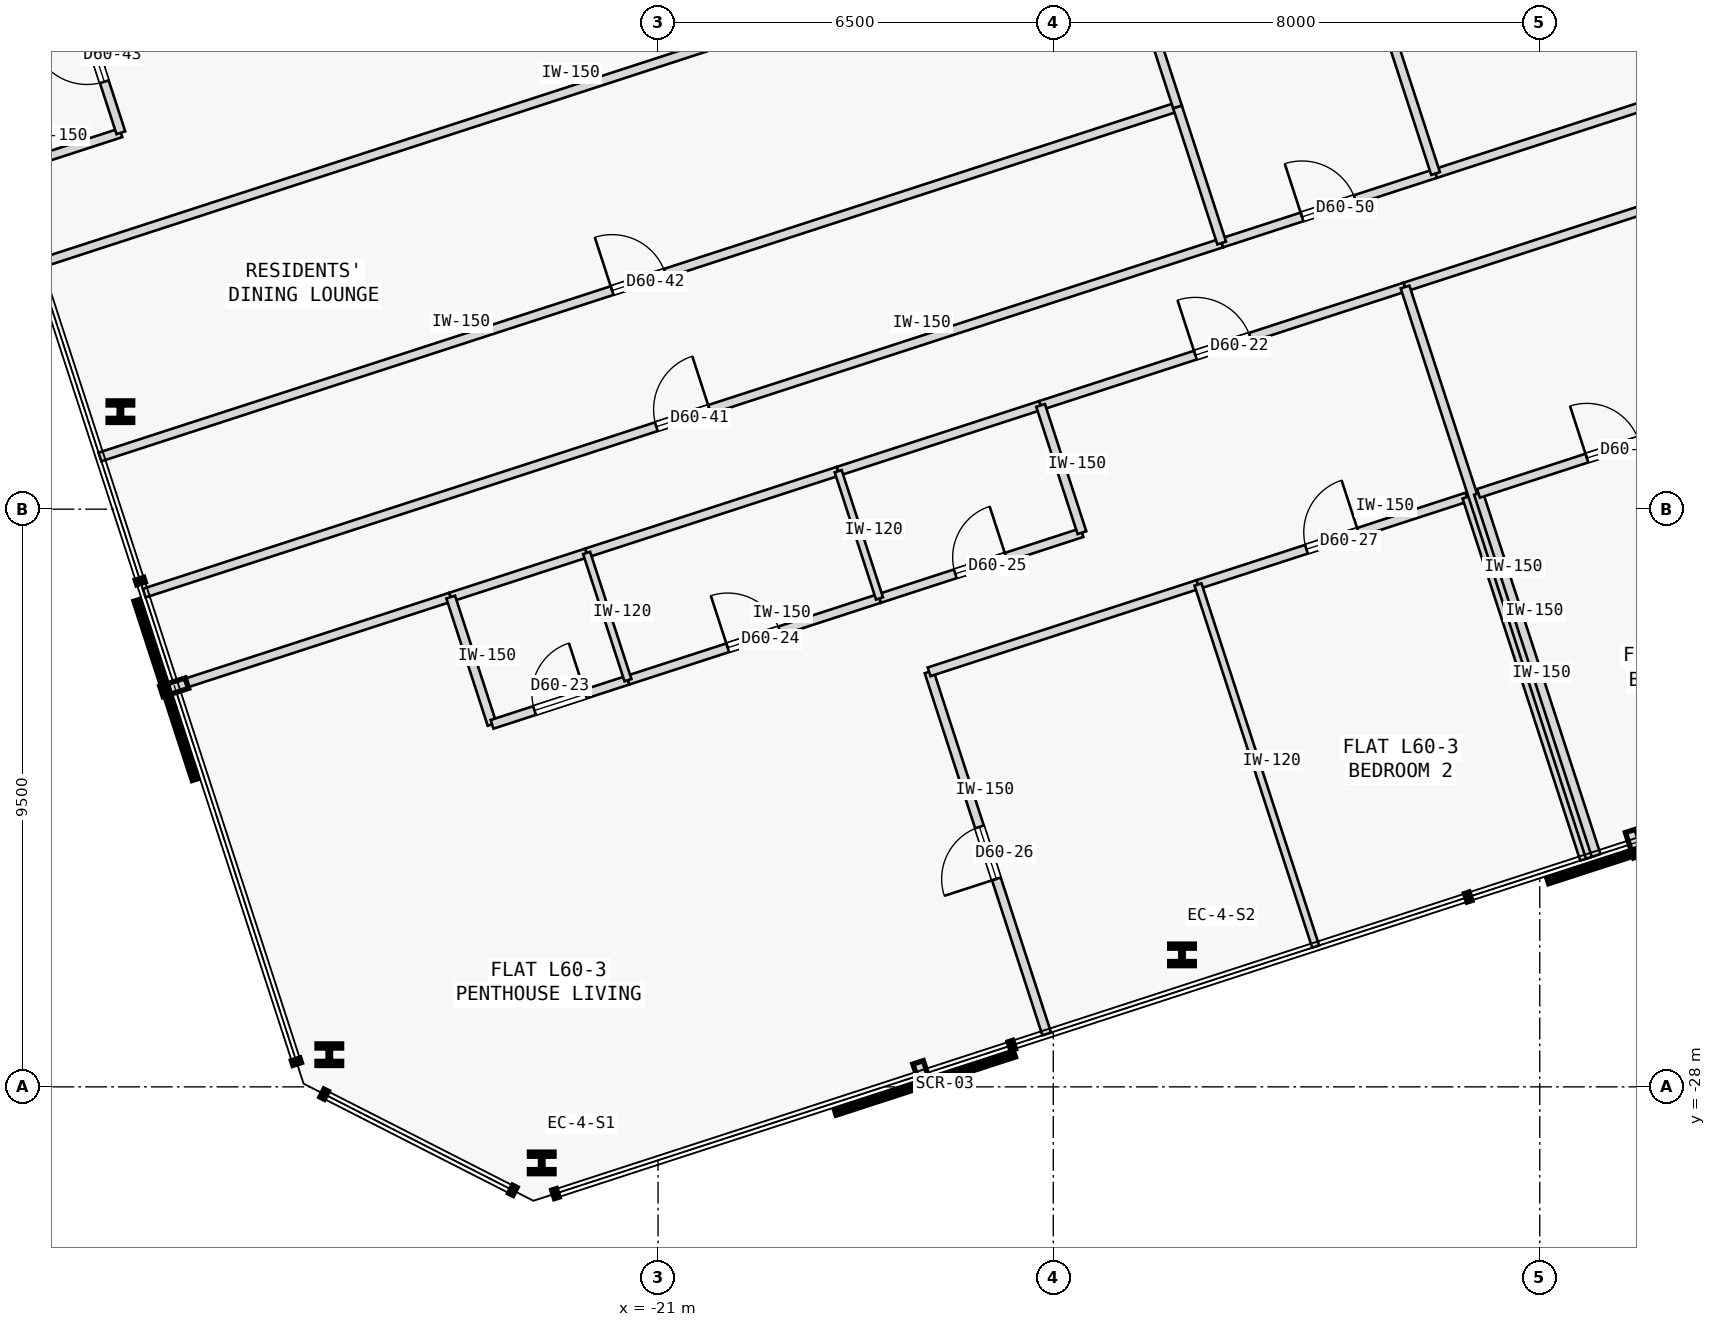
"""IFC4 building model, lengths in metres.
Left out: names, types, materials, properties, quantities, classifications, styles, units other than length and angle.
Written with IfcOpenShell. Run it as: python <this file> out.ifc"""

import sys

from ifc_helpers import new_model, si_unit, direction, frame, frame_2d, origin, origin_2d, place, context, subcontext, project, spatial, rectangle, i_section, extrude, element, fill, save


model = new_model("IFC4")
c1 = context("Model", 3, precision=1e-05, world=origin(), true_north=direction((0.0, 1.0)))
c2 = subcontext(c1, "Body", "Model", "MODEL_VIEW")
j1 = project(units=[si_unit("LENGTHUNIT", "METRE"), si_unit("PLANEANGLEUNIT", "RADIAN")], contexts=[c1])
p1 = place(None, origin())
s1 = spatial("IfcSite", under=j1, at=p1, CompositionType="ELEMENT")
p2 = place(p1, origin())
s2 = spatial("IfcBuilding", under=s1, at=p2, CompositionType="ELEMENT")
p3 = place(p2, frame((0.0, 0.0, 227.65)))
s3 = spatial("IfcBuildingStorey", under=s2, at=p3, CompositionType="ELEMENT", Elevation=227.65)
for number, where, z_axis, x_axis in (
    (1, (-22.913, -29.251, 0.0), (0.0, 0.0, 1.0), (1.0, 0.0, 0.0)),
    (2, (-12.384, -25.83, 0.0), (0.0, 0.0, 1.0), (1.0, 0.0, 0.0)),
    (3, (-29.842, -16.897, 0.0), (0.0, 0.0, 1.0), (1.0, 0.0, 0.0)),
    (4, (-26.406, -27.471, 0.0), (0.0, 0.0, 1.0), (1.0, 0.0, 0.0)),
):
    element("IfcColumn", number, at=place(p3, frame(where, z_axis=z_axis, x_axis=x_axis)), inside=s3, PredefinedType="COLUMN", context=c2, shape_type="SweptSolid", body=[
        extrude(i_section(OverallWidth=0.405, OverallDepth=0.355, WebThickness=0.042, FlangeThickness=0.068, FilletRadius=0.015, at=origin_2d()), origin(), (0.0, 0.0, 1.0), 3.35),
    ])
p4 = place(p3, frame((-28.95, -21.421, 0.0), z_axis=(0.0, 0.0, 1.0), x_axis=(0.951049476022, 0.309038661268, 0.0)))
e5 = element("IfcWall", 5, at=p4, inside=s3, PredefinedType="PARTITIONING", context=c2, shape_type="SweptSolid", body=[
    extrude(rectangle(XDim=4.774, YDim=0.15, at=frame_2d((2.387, 0.0))), origin(), (0.0, 0.0, 1.0), 3.125),
])
p5 = place(p3, frame((-14.709, -16.794, 0.0), z_axis=(0.0, 0.0, 1.0), x_axis=(0.951050295235, 0.309036140172, 0.0)))
e6 = element("IfcWall", 6, at=p5, inside=s3, PredefinedType="PARTITIONING", context=c2, shape_type="SweptSolid", body=[
    extrude(rectangle(XDim=6.302, YDim=0.15, at=frame_2d((3.151, 0.0))), origin(), (0.0, 0.0, 1.0), 3.125),
])
p6 = place(p5, frame((2.676, 0.0, 0.0)))
e7 = element("IfcOpeningElement", 7, at=p6, cuts=e6, PredefinedType="OPENING", context=c2, shape_type="SweptSolid", body=[
    extrude(rectangle(XDim=0.95, YDim=2.15, at=frame_2d((0.475, 1.075))), frame((0.0, 0.085, 0.0), z_axis=(0.0, -1.0, 0.0), x_axis=(1.0, 0.0, 0.0)), (0.0, 0.0, 1.0), 0.17),
])
p7 = place(p3, frame((-24.41, -19.946, 0.0), z_axis=(0.0, 0.0, 1.0), x_axis=(0.951076048914, 0.308956872689, 0.0)))
e8 = element("IfcWall", 8, at=p7, inside=s3, PredefinedType="PARTITIONING", context=c2, shape_type="SweptSolid", body=[
    extrude(rectangle(XDim=2.35, YDim=0.15, at=frame_2d((1.175, 0.0))), origin(), (0.0, 0.0, 1.0), 3.125),
])
p8 = place(p3, frame((-22.175, -19.22, 0.0), z_axis=(0.0, 0.0, 1.0), x_axis=(0.951052627573, 0.309028962374, 0.0)))
e9 = element("IfcWall", 9, at=p8, inside=s3, PredefinedType="PARTITIONING", context=c2, shape_type="SweptSolid", body=[
    extrude(rectangle(XDim=4.35, YDim=0.15, at=frame_2d((2.175, 0.0))), origin(), (0.0, 0.0, 1.0), 3.125),
])
p9 = place(p3, frame((-18.038, -17.876, 0.0), z_axis=(0.0, 0.0, 1.0), x_axis=(0.951062257173, 0.308999325213, 0.0)))
e10 = element("IfcWall", 10, at=p9, inside=s3, PredefinedType="PARTITIONING", context=c2, shape_type="SweptSolid", body=[
    extrude(rectangle(XDim=3.5, YDim=0.15, at=frame_2d((1.75, 0.0))), origin(), (0.0, 0.0, 1.0), 3.125),
])
p10 = place(p3, frame((-8.715, -14.847, 0.0), z_axis=(0.0, 0.0, 1.0), x_axis=(0.951061767293, 0.309000832997, 0.0)))
e11 = element("IfcWall", 11, at=p10, inside=s3, PredefinedType="PARTITIONING", context=c2, shape_type="SweptSolid", body=[
    extrude(rectangle(XDim=4.404, YDim=0.15, at=frame_2d((2.202, 0.0))), origin(), (0.0, 0.0, 1.0), 3.125),
])
p11 = place(p3, frame((-29.45, -19.881, 0.0), z_axis=(0.0, 0.0, 1.0), x_axis=(0.95105650271, 0.309017036186, 0.0)))
e12 = element("IfcWall", 12, at=p11, inside=s3, PredefinedType="PARTITIONING", context=c2, shape_type="SweptSolid", body=[
    extrude(rectangle(XDim=18.632, YDim=0.15, at=frame_2d((9.316, 0.0))), origin(), (0.0, 0.0, 1.0), 3.125),
])
p12 = place(p11, frame((8.856, 0.0, 0.0)))
e13 = element("IfcOpeningElement", 13, at=p12, cuts=e12, PredefinedType="OPENING", context=c2, shape_type="SweptSolid", body=[
    extrude(rectangle(XDim=0.92, YDim=2.15, at=frame_2d((0.46, 1.075))), frame((0.0, 0.085, 0.0), z_axis=(0.0, -1.0, 0.0), x_axis=(1.0, 0.0, 0.0)), (0.0, 0.0, 1.0), 0.17),
])
p13 = place(p3, frame((-31.712, -12.921, 0.0), z_axis=(0.0, 0.0, 1.0), x_axis=(0.951054051148, 0.309024581215, 0.0)))
e14 = element("IfcWall", 14, at=p13, inside=s3, PredefinedType="PARTITIONING", context=c2, shape_type="SweptSolid", body=[
    extrude(rectangle(XDim=1.975, YDim=0.15, at=frame_2d((0.988, 0.0))), origin(), (0.0, 0.0, 1.0), 3.125),
])
p14 = place(p3, frame((-29.833, -12.311, 0.0), z_axis=(0.0, 0.0, 1.0), x_axis=(-0.309044953986, 0.951047431213, 0.0)))
e15 = element("IfcWall", 15, at=p14, inside=s3, PredefinedType="PARTITIONING", context=c2, shape_type="SweptSolid", body=[
    extrude(rectangle(XDim=2.685, YDim=0.15, at=frame_2d((1.343, 0.0))), origin(), (0.0, 0.0, 1.0), 3.125),
])
p15 = place(p14, frame((0.883, 0.0, 0.0)))
e16 = element("IfcOpeningElement", 16, at=p15, cuts=e15, PredefinedType="OPENING", context=c2, shape_type="SweptSolid", body=[
    extrude(rectangle(XDim=0.92, YDim=2.15, at=frame_2d((0.46, 1.075))), frame((0.0, 0.085, 0.0), z_axis=(0.0, -1.0, 0.0), x_axis=(1.0, 0.0, 0.0)), (0.0, 0.0, 1.0), 0.17),
])
p16 = place(p3, frame((-11.73, -14.123, 0.0), z_axis=(0.0, 0.0, 1.0), x_axis=(0.951052502763, 0.309029346483, 0.0)))
e17 = element("IfcWall", 17, at=p16, inside=s3, PredefinedType="PARTITIONING", context=c2, shape_type="SweptSolid", body=[
    extrude(rectangle(XDim=3.698, YDim=0.15, at=frame_2d((1.849, 0.0))), origin(), (0.0, 0.0, 1.0), 3.125),
])
p17 = place(p16, frame((1.389, 0.0, 0.0)))
e18 = element("IfcOpeningElement", 18, at=p17, cuts=e17, PredefinedType="OPENING", context=c2, shape_type="SweptSolid", body=[
    extrude(rectangle(XDim=0.92, YDim=2.15, at=frame_2d((0.46, 1.075))), frame((0.0, 0.085, 0.0), z_axis=(0.0, -1.0, 0.0), x_axis=(1.0, 0.0, 0.0)), (0.0, 0.0, 1.0), 0.17),
])
p18 = place(p3, frame((-8.213, -12.98, 0.0), z_axis=(0.0, 0.0, 1.0), x_axis=(0.951058260096, 0.309011627456, 0.0)))
e19 = element("IfcWall", 19, at=p18, inside=s3, PredefinedType="PARTITIONING", context=c2, shape_type="SweptSolid", body=[
    extrude(rectangle(XDim=4.746, YDim=0.15, at=frame_2d((2.373, 0.0))), origin(), (0.0, 0.0, 1.0), 3.125),
])
p19 = place(p3, frame((-23.73, -22.038, 0.0), z_axis=(0.0, 0.0, 1.0), x_axis=(-0.309060979314, 0.951042223598, 0.0)))
e20 = element("IfcWall", 20, at=p19, inside=s3, PredefinedType="PARTITIONING", context=c2, shape_type="SweptSolid", body=[
    extrude(rectangle(XDim=2.2, YDim=0.15, at=frame_2d((1.1, 0.0))), origin(), (0.0, 0.0, 1.0), 3.125),
])
p20 = place(p3, frame((-23.73, -22.038, 0.0), z_axis=(0.0, 0.0, 1.0), x_axis=(0.951066131077, 0.308987401554, 0.0)))
e21 = element("IfcWall", 21, at=p20, inside=s3, PredefinedType="PARTITIONING", context=c2, shape_type="SweptSolid", body=[
    extrude(rectangle(XDim=2.35, YDim=0.15, at=frame_2d((1.175, 0.0))), origin(), (0.0, 0.0, 1.0), 3.125),
])
p21 = place(p20, frame((0.735, 0.0, 0.0)))
e22 = element("IfcOpeningElement", 22, at=p21, cuts=e21, PredefinedType="OPENING", context=c2, shape_type="SweptSolid", body=[
    extrude(rectangle(XDim=0.88, YDim=2.15, at=frame_2d((0.44, 1.075))), frame((0.0, 0.085, 0.0), z_axis=(0.0, -1.0, 0.0), x_axis=(1.0, 0.0, 0.0)), (0.0, 0.0, 1.0), 0.17),
])
p22 = place(p3, frame((-21.495, -21.312, 0.0), z_axis=(0.0, 0.0, 1.0), x_axis=(0.951057987102, 0.309012467661, 0.0)))
e23 = element("IfcWall", 23, at=p22, inside=s3, PredefinedType="PARTITIONING", context=c2, shape_type="SweptSolid", body=[
    extrude(rectangle(XDim=4.35, YDim=0.15, at=frame_2d((2.175, 0.0))), origin(), (0.0, 0.0, 1.0), 3.125),
])
p23 = place(p22, frame((1.725, 0.0, 0.0)))
e24 = element("IfcOpeningElement", 24, at=p23, cuts=e23, PredefinedType="OPENING", context=c2, shape_type="SweptSolid", body=[
    extrude(rectangle(XDim=0.9, YDim=2.15, at=frame_2d((0.45, 1.075))), frame((0.0, 0.085, 0.0), z_axis=(0.0, -1.0, 0.0), x_axis=(1.0, 0.0, 0.0)), (0.0, 0.0, 1.0), 0.17),
])
p24 = place(p3, frame((-17.358, -19.968, 0.0), z_axis=(0.0, 0.0, 1.0), x_axis=(0.951055596592, 0.309019824916, 0.0)))
e25 = element("IfcWall", 25, at=p24, inside=s3, PredefinedType="PARTITIONING", context=c2, shape_type="SweptSolid", body=[
    extrude(rectangle(XDim=3.5, YDim=0.15, at=frame_2d((1.75, 0.0))), origin(), (0.0, 0.0, 1.0), 3.125),
])
p25 = place(p24, frame((1.31, 0.0, 0.0)))
e26 = element("IfcOpeningElement", 26, at=p25, cuts=e25, PredefinedType="OPENING", context=c2, shape_type="SweptSolid", body=[
    extrude(rectangle(XDim=0.88, YDim=2.15, at=frame_2d((0.44, 1.075))), frame((0.0, 0.085, 0.0), z_axis=(0.0, -1.0, 0.0), x_axis=(1.0, 0.0, 0.0)), (0.0, 0.0, 1.0), 0.17),
])
p26 = place(p3, frame((-14.029, -18.886, 0.0), z_axis=(0.0, 0.0, 1.0), x_axis=(-0.308960600764, 0.951074837842, 0.0)))
e27 = element("IfcWall", 27, at=p26, inside=s3, PredefinedType="PARTITIONING", context=c2, shape_type="SweptSolid", body=[
    extrude(rectangle(XDim=2.2, YDim=0.15, at=frame_2d((1.1, 0.0))), origin(), (0.0, 0.0, 1.0), 3.125),
])
p27 = place(p3, frame((-14.608, -27.131, 0.0), z_axis=(0.0, 0.0, 1.0), x_axis=(-0.309013782848, 0.951057559777, 0.0)))
e28 = element("IfcWall", 28, at=p27, inside=s3, PredefinedType="PARTITIONING", context=c2, shape_type="SweptSolid", body=[
    extrude(rectangle(XDim=6.262, YDim=0.15, at=frame_2d((3.131, 0.0))), origin(), (0.0, 0.0, 1.0), 3.125),
])
p28 = place(p27, frame((2.681, 0.0, 0.0)))
e29 = element("IfcOpeningElement", 29, at=p28, cuts=e28, PredefinedType="OPENING", context=c2, shape_type="SweptSolid", body=[
    extrude(rectangle(XDim=0.9, YDim=2.15, at=frame_2d((0.45, 1.075))), frame((0.0, 0.085, 0.0), z_axis=(0.0, -1.0, 0.0), x_axis=(1.0, 0.0, 0.0)), (0.0, 0.0, 1.0), 0.17),
])
p29 = place(p3, frame((-16.543, -21.175, 0.0), z_axis=(0.0, 0.0, 1.0), x_axis=(0.951050272606, 0.309036209813, 0.0)))
e30 = element("IfcWall", 30, at=p29, inside=s3, PredefinedType="PARTITIONING", context=c2, shape_type="SweptSolid", body=[
    extrude(rectangle(XDim=4.65, YDim=0.15, at=frame_2d((2.325, 0.0))), origin(), (0.0, 0.0, 1.0), 3.125),
])
p30 = place(p3, frame((-12.12, -19.738, 0.0), z_axis=(0.0, 0.0, 1.0), x_axis=(0.951065702951, 0.308988719326, 0.0)))
e31 = element("IfcWall", 31, at=p30, inside=s3, PredefinedType="PARTITIONING", context=c2, shape_type="SweptSolid", body=[
    extrude(rectangle(XDim=4.65, YDim=0.15, at=frame_2d((2.325, 0.0))), origin(), (0.0, 0.0, 1.0), 3.125),
])
p31 = place(p30, frame((1.875, 0.0, 0.0)))
e32 = element("IfcOpeningElement", 32, at=p31, cuts=e31, PredefinedType="OPENING", context=c2, shape_type="SweptSolid", body=[
    extrude(rectangle(XDim=0.9, YDim=2.15, at=frame_2d((0.45, 1.075))), frame((0.0, 0.085, 0.0), z_axis=(0.0, -1.0, 0.0), x_axis=(1.0, 0.0, 0.0)), (0.0, 0.0, 1.0), 0.17),
])
p32 = place(p3, frame((-5.763, -24.257, 0.0), z_axis=(0.0, 0.0, 1.0), x_axis=(-0.309060506107, 0.951042377376, 0.0)))
e33 = element("IfcWall", 33, at=p32, inside=s3, PredefinedType="PARTITIONING", context=c2, shape_type="SweptSolid", body=[
    extrude(rectangle(XDim=6.262, YDim=0.15, at=frame_2d((3.131, 0.0))), origin(), (0.0, 0.0, 1.0), 3.125),
])
p33 = place(p3, frame((-5.668, -24.226, 0.0), z_axis=(0.0, 0.0, 1.0), x_axis=(-0.309022258842, 0.95105480575, 0.0)))
e34 = element("IfcWall", 34, at=p33, inside=s3, PredefinedType="PARTITIONING", context=c2, shape_type="SweptSolid", body=[
    extrude(rectangle(XDim=9.862, YDim=0.15, at=frame_2d((4.931, 0.0))), origin(), (0.0, 0.0, 1.0), 3.125),
])
for number, where, z_axis, x_axis in (
    (35, (-21.495, -21.312, 0.0), (0.0, 0.0, 1.0), (-0.309, 0.951, 0.0)),
    (36, (-17.358, -19.968, 0.0), (0.0, 0.0, 1.0), (-0.309, 0.951, 0.0)),
):
    element("IfcWall", number, at=place(p3, frame(where, z_axis=z_axis, x_axis=x_axis)), inside=s3, PredefinedType="PARTITIONING", context=c2, shape_type="SweptSolid", body=[
        extrude(rectangle(XDim=2.2, YDim=0.12, at=frame_2d((1.1, 0.0))), origin(), (0.0, 0.0, 1.0), 3.125),
    ])
p34 = place(p3, frame((-10.185, -25.694, 0.0), z_axis=(0.0, 0.0, 1.0), x_axis=(-0.309013782848, 0.951057559777, 0.0)))
e37 = element("IfcWall", 37, at=p34, inside=s3, PredefinedType="PARTITIONING", context=c2, shape_type="SweptSolid", body=[
    extrude(rectangle(XDim=6.262, YDim=0.12, at=frame_2d((3.131, 0.0))), origin(), (0.0, 0.0, 1.0), 3.125),
])
p35 = place(p3, frame((-5.573, -24.195, 0.0), z_axis=(0.0, 0.0, 1.0), x_axis=(-0.309049046683, 0.951046101272, 0.0)))
e38 = element("IfcWall", 38, at=p35, inside=s3, PredefinedType="PARTITIONING", context=c2, shape_type="SweptSolid", body=[
    extrude(rectangle(XDim=6.262, YDim=0.15, at=frame_2d((3.131, 0.0))), origin(), (0.0, 0.0, 1.0), 3.125),
])
p36 = place(p3, frame((-7.508, -18.24, 0.0), z_axis=(0.0, 0.0, 1.0), x_axis=(0.951070715387, 0.308973290646, 0.0)))
e39 = element("IfcWall", 39, at=p36, inside=s3, PredefinedType="PARTITIONING", context=c2, shape_type="SweptSolid", body=[
    extrude(rectangle(XDim=4.65, YDim=0.15, at=frame_2d((2.325, 0.0))), origin(), (0.0, 0.0, 1.0), 3.125),
])
p37 = place(p36, frame((1.875, 0.0, 0.0)))
e40 = element("IfcOpeningElement", 40, at=p37, cuts=e39, PredefinedType="OPENING", context=c2, shape_type="SweptSolid", body=[
    extrude(rectangle(XDim=0.9, YDim=2.15, at=frame_2d((0.45, 1.075))), frame((0.0, 0.085, 0.0), z_axis=(0.0, -1.0, 0.0), x_axis=(1.0, 0.0, 0.0)), (0.0, 0.0, 1.0), 0.17),
])
p38 = place(p3, frame((-30.178, -17.642, 0.0), z_axis=(0.0, 0.0, 1.0), x_axis=(0.95105650271, 0.309017036186, 0.0)))
e41 = element("IfcWall", 41, at=p38, inside=s3, PredefinedType="PARTITIONING", context=c2, shape_type="SweptSolid", body=[
    extrude(rectangle(XDim=18.632, YDim=0.15, at=frame_2d((9.316, 0.0))), origin(), (0.0, 0.0, 1.0), 3.125),
])
p39 = place(p38, frame((8.856, 0.0, 0.0)))
e42 = element("IfcOpeningElement", 42, at=p39, cuts=e41, PredefinedType="OPENING", context=c2, shape_type="SweptSolid", body=[
    extrude(rectangle(XDim=0.92, YDim=2.15, at=frame_2d((0.46, 1.075))), frame((0.0, 0.085, 0.0), z_axis=(0.0, -1.0, 0.0), x_axis=(1.0, 0.0, 0.0)), (0.0, 0.0, 1.0), 0.17),
])
p40 = place(p3, frame((-11.73, -14.123, 0.0), z_axis=(0.0, 0.0, 1.0), x_axis=(-0.309062621189, 0.951041690035, 0.0)))
e43 = element("IfcWall", 43, at=p40, inside=s3, PredefinedType="PARTITIONING", context=c2, shape_type="SweptSolid", body=[
    extrude(rectangle(XDim=2.354, YDim=0.15, at=frame_2d((1.177, 0.0))), origin(), (0.0, 0.0, 1.0), 3.125),
])
p41 = place(p3, frame((-31.208, -14.471, 0.0), z_axis=(0.0, 0.0, 1.0), x_axis=(0.951057753948, 0.309013185244, 0.0)))
e44 = element("IfcWall", 44, at=p41, inside=s3, PredefinedType="PARTITIONING", context=c2, shape_type="SweptSolid", body=[
    extrude(rectangle(XDim=18.632, YDim=0.15, at=frame_2d((9.316, 0.0))), origin(), (0.0, 0.0, 1.0), 3.125),
])
p42 = place(p3, frame((-12.458, -11.884, 0.0), z_axis=(0.0, 0.0, 1.0), x_axis=(-0.308946982245, 0.951079261766, 0.0)))
e45 = element("IfcWall", 45, at=p42, inside=s3, PredefinedType="PARTITIONING", context=c2, shape_type="SweptSolid", body=[
    extrude(rectangle(XDim=3.334, YDim=0.15, at=frame_2d((1.667, 0.0))), origin(), (0.0, 0.0, 1.0), 3.125),
])
p43 = place(p3, frame((-8.213, -12.98, 0.0), z_axis=(0.0, 0.0, 1.0), x_axis=(-0.309017065592, 0.951056493155, 0.0)))
e46 = element("IfcWall", 46, at=p43, inside=s3, PredefinedType="PARTITIONING", context=c2, shape_type="SweptSolid", body=[
    extrude(rectangle(XDim=7.76, YDim=0.15, at=frame_2d((3.88, 0.0))), origin(), (0.0, 0.0, 1.0), 3.125),
])
p44 = place(p6, origin())
e47 = element("IfcDoor", 47, at=p44, inside=s3, OperationType="SINGLE_SWING_LEFT", PredefinedType="DOOR", context=c2, shape_type="SweptSolid", body=[
    extrude(rectangle(XDim=0.95, YDim=2.15, at=frame_2d((0.475, 1.075))), frame((0.0, 0.025, 0.0), z_axis=(0.0, -1.0, 0.0), x_axis=(1.0, 0.0, 0.0)), (0.0, 0.0, 1.0), 0.05),
])
fill(e7, e47)
p45 = place(p21, origin())
e48 = element("IfcDoor", 48, at=p45, inside=s3, OperationType="SINGLE_SWING_RIGHT", PredefinedType="DOOR", context=c2, shape_type="SweptSolid", body=[
    extrude(rectangle(XDim=0.88, YDim=2.15, at=frame_2d((0.44, 1.075))), frame((0.0, 0.025, 0.0), z_axis=(0.0, -1.0, 0.0), x_axis=(1.0, 0.0, 0.0)), (0.0, 0.0, 1.0), 0.05),
])
fill(e22, e48)
p46 = place(p23, origin())
e49 = element("IfcDoor", 49, at=p46, inside=s3, OperationType="SINGLE_SWING_LEFT", PredefinedType="DOOR", context=c2, shape_type="SweptSolid", body=[
    extrude(rectangle(XDim=0.9, YDim=2.15, at=frame_2d((0.45, 1.075))), frame((0.0, 0.025, 0.0), z_axis=(0.0, -1.0, 0.0), x_axis=(1.0, 0.0, 0.0)), (0.0, 0.0, 1.0), 0.05),
])
fill(e24, e49)
p47 = place(p25, origin())
e50 = element("IfcDoor", 50, at=p47, inside=s3, OperationType="SINGLE_SWING_RIGHT", PredefinedType="DOOR", context=c2, shape_type="SweptSolid", body=[
    extrude(rectangle(XDim=0.88, YDim=2.15, at=frame_2d((0.44, 1.075))), frame((0.0, 0.025, 0.0), z_axis=(0.0, -1.0, 0.0), x_axis=(1.0, 0.0, 0.0)), (0.0, 0.0, 1.0), 0.05),
])
fill(e26, e50)
p48 = place(p28, origin())
e51 = element("IfcDoor", 51, at=p48, inside=s3, OperationType="SINGLE_SWING_LEFT", PredefinedType="DOOR", context=c2, shape_type="SweptSolid", body=[
    extrude(rectangle(XDim=0.9, YDim=2.15, at=frame_2d((0.45, 1.075))), frame((0.0, 0.025, 0.0), z_axis=(0.0, -1.0, 0.0), x_axis=(1.0, 0.0, 0.0)), (0.0, 0.0, 1.0), 0.05),
])
fill(e29, e51)
p49 = place(p31, origin())
e52 = element("IfcDoor", 52, at=p49, inside=s3, OperationType="SINGLE_SWING_RIGHT", PredefinedType="DOOR", context=c2, shape_type="SweptSolid", body=[
    extrude(rectangle(XDim=0.9, YDim=2.15, at=frame_2d((0.45, 1.075))), frame((0.0, 0.025, 0.0), z_axis=(0.0, -1.0, 0.0), x_axis=(1.0, 0.0, 0.0)), (0.0, 0.0, 1.0), 0.05),
])
fill(e32, e52)
p50 = place(p37, origin())
e53 = element("IfcDoor", 53, at=p50, inside=s3, OperationType="SINGLE_SWING_LEFT", PredefinedType="DOOR", context=c2, shape_type="SweptSolid", body=[
    extrude(rectangle(XDim=0.9, YDim=2.15, at=frame_2d((0.45, 1.075))), frame((0.0, 0.025, 0.0), z_axis=(0.0, -1.0, 0.0), x_axis=(1.0, 0.0, 0.0)), (0.0, 0.0, 1.0), 0.05),
])
fill(e40, e53)
p51 = place(p12, origin())
e54 = element("IfcDoor", 54, at=p51, inside=s3, OperationType="SINGLE_SWING_RIGHT", PredefinedType="DOOR", context=c2, shape_type="SweptSolid", body=[
    extrude(rectangle(XDim=0.92, YDim=2.15, at=frame_2d((0.46, 1.075))), frame((0.0, 0.025, 0.0), z_axis=(0.0, -1.0, 0.0), x_axis=(1.0, 0.0, 0.0)), (0.0, 0.0, 1.0), 0.05),
])
fill(e13, e54)
p52 = place(p39, origin())
e55 = element("IfcDoor", 55, at=p52, inside=s3, OperationType="SINGLE_SWING_LEFT", PredefinedType="DOOR", context=c2, shape_type="SweptSolid", body=[
    extrude(rectangle(XDim=0.92, YDim=2.15, at=frame_2d((0.46, 1.075))), frame((0.0, 0.025, 0.0), z_axis=(0.0, -1.0, 0.0), x_axis=(1.0, 0.0, 0.0)), (0.0, 0.0, 1.0), 0.05),
])
fill(e42, e55)
p53 = place(p15, origin())
e56 = element("IfcDoor", 56, at=p53, inside=s3, OperationType="SINGLE_SWING_RIGHT", PredefinedType="DOOR", context=c2, shape_type="SweptSolid", body=[
    extrude(rectangle(XDim=0.92, YDim=2.15, at=frame_2d((0.46, 1.075))), frame((0.0, 0.025, 0.0), z_axis=(0.0, -1.0, 0.0), x_axis=(1.0, 0.0, 0.0)), (0.0, 0.0, 1.0), 0.05),
])
fill(e16, e56)
p54 = place(p17, origin())
e57 = element("IfcDoor", 57, at=p54, inside=s3, OperationType="SINGLE_SWING_LEFT", PredefinedType="DOOR", context=c2, shape_type="SweptSolid", body=[
    extrude(rectangle(XDim=0.92, YDim=2.15, at=frame_2d((0.46, 1.075))), frame((0.0, 0.025, 0.0), z_axis=(0.0, -1.0, 0.0), x_axis=(1.0, 0.0, 0.0)), (0.0, 0.0, 1.0), 0.05),
])
fill(e18, e57)
save(model, sys.argv[1])
